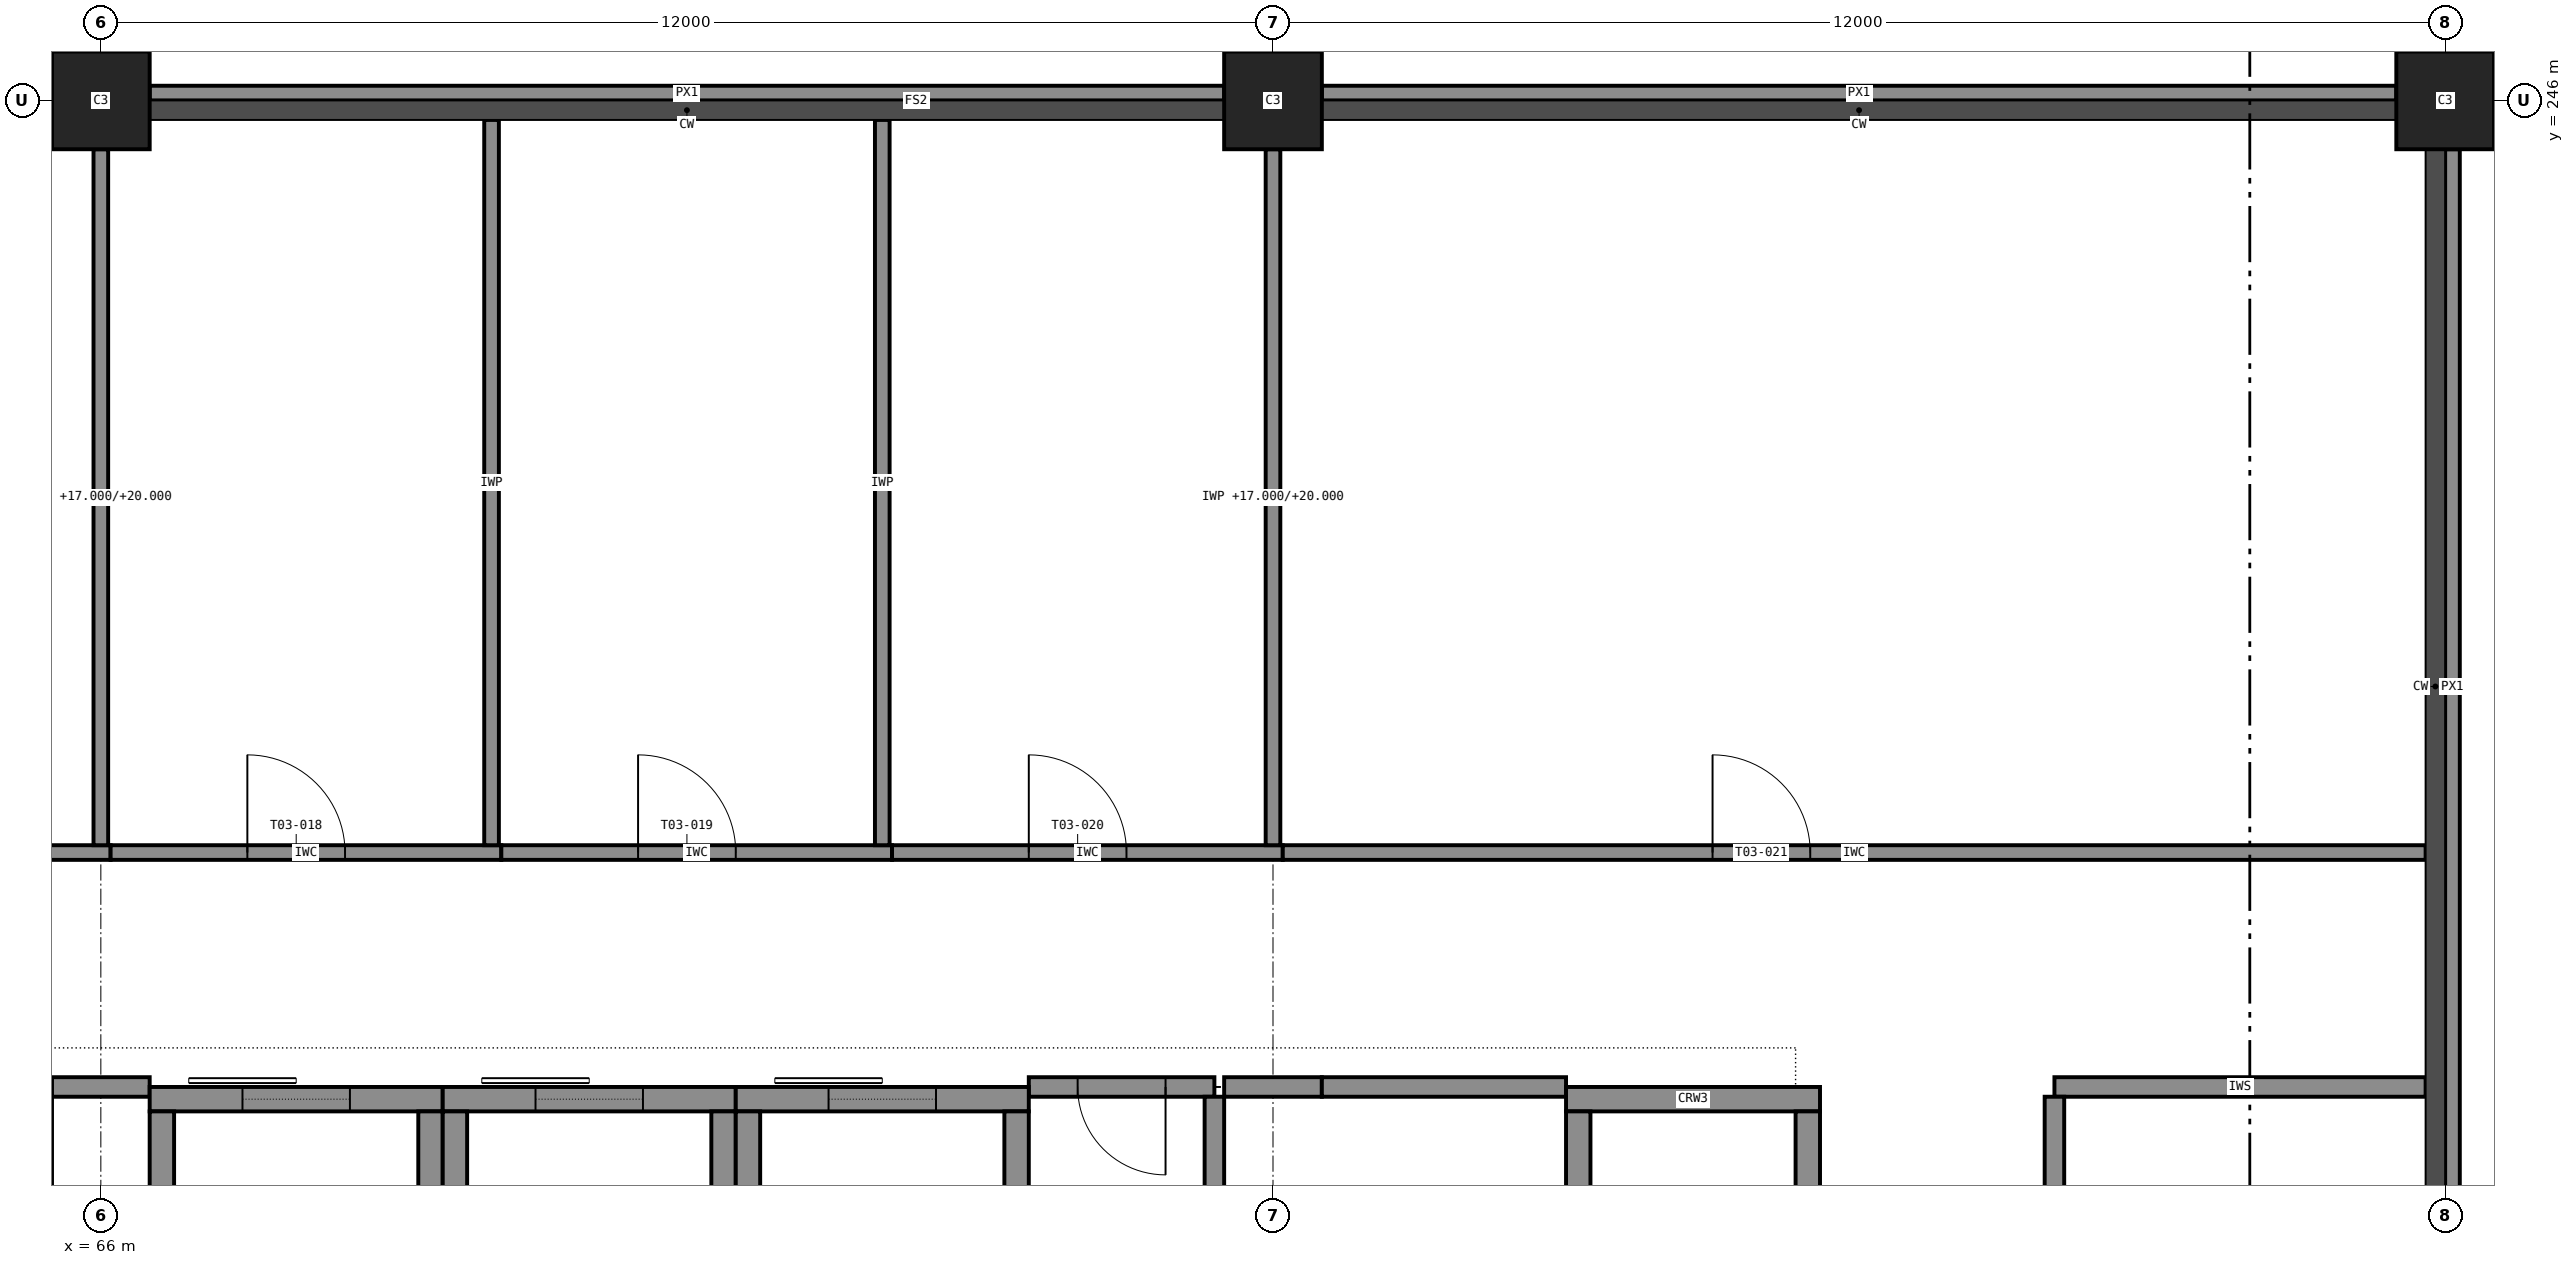
"""IFC4 building model, lengths in metres.
Left out: names, types, materials, properties, quantities, classifications, styles, units other than length and angle.
Written with IfcOpenShell. Run it as: python <this file> out.ifc"""

import sys

from ifc_helpers import new_model, si_unit, direction, frame, frame_2d, origin, origin_2d, place, context, subcontext, project, spatial, rectangle, extrude, element, fill, save


model = new_model("IFC4")
c1 = context("Model", 3, precision=1e-05, world=origin(), true_north=direction((0.0, 1.0)))
c2 = subcontext(c1, "Body", "Model", "MODEL_VIEW")
j1 = project(units=[si_unit("LENGTHUNIT", "METRE"), si_unit("PLANEANGLEUNIT", "RADIAN")], contexts=[c1])
p1 = place(None, origin())
s1 = spatial("IfcSite", under=j1, at=p1, CompositionType="ELEMENT")
p2 = place(p1, origin())
s2 = spatial("IfcBuilding", under=s1, at=p2, CompositionType="ELEMENT")
p3 = place(p2, frame((0.0, 0.0, 17.0)))
s3 = spatial("IfcBuildingStorey", under=s2, at=p3, CompositionType="ELEMENT", Elevation=17.0)
for number, where, z_axis, x_axis in (
    (1, (66.0, 246.0, 0.0), (0.0, 0.0, 1.0), (1.0, 0.0, 0.0)),
    (2, (78.0, 246.0, 0.0), (0.0, 0.0, 1.0), (1.0, 0.0, 0.0)),
    (3, (90.0, 246.0, 0.0), (0.0, 0.0, 1.0), (1.0, 0.0, 0.0)),
):
    element("IfcColumn", number, at=place(p3, frame(where, z_axis=z_axis, x_axis=x_axis)), inside=s3, PredefinedType="COLUMN", context=c2, shape_type="SweptSolid", body=[
        extrude(rectangle(XDim=1.0, YDim=1.0, at=origin_2d()), origin(), (0.0, 0.0, 1.0), 4.0),
    ])
p4 = place(p3, frame((66.5, 235.775, 0.0), z_axis=(0.0, 0.0, 1.0), x_axis=(1.0, 0.0, 0.0)))
e4 = element("IfcWall", 4, at=p4, inside=s3, PredefinedType="SHEAR", context=c2, shape_type="SweptSolid", body=[
    extrude(rectangle(XDim=3.0, YDim=0.25, at=frame_2d((1.5, 0.0))), origin(), (0.0, 0.0, 1.0), 4.0),
])
p5 = place(p4, frame((0.95, 0.0, 0.0)))
e5 = element("IfcOpeningElement", 5, at=p5, cuts=e4, PredefinedType="OPENING", context=c2, shape_type="SweptSolid", body=[
    extrude(rectangle(XDim=1.1, YDim=2.1, at=frame_2d((0.55, 1.05))), frame((0.0, 0.135, 0.0), z_axis=(0.0, -1.0, 0.0), x_axis=(1.0, 0.0, 0.0)), (0.0, 0.0, 1.0), 0.27),
])
for number, where, z_axis, x_axis in (
    (6, (66.625, 232.35, 0.0), (0.0, 0.0, 1.0), (0.0, 1.0, 0.0)),
    (7, (69.375, 232.35, 0.0), (0.0, 0.0, 1.0), (0.0, 1.0, 0.0)),
):
    element("IfcWall", number, at=place(p3, frame(where, z_axis=z_axis, x_axis=x_axis)), inside=s3, PredefinedType="SHEAR", context=c2, shape_type="SweptSolid", body=[
        extrude(rectangle(XDim=3.3, YDim=0.25, at=frame_2d((1.65, 0.0))), origin(), (0.0, 0.0, 1.0), 4.0),
    ])
p6 = place(p3, frame((69.5, 235.775, 0.0), z_axis=(0.0, 0.0, 1.0), x_axis=(1.0, 0.0, 0.0)))
e8 = element("IfcWall", 8, at=p6, inside=s3, PredefinedType="SHEAR", context=c2, shape_type="SweptSolid", body=[
    extrude(rectangle(XDim=3.0, YDim=0.25, at=frame_2d((1.5, 0.0))), origin(), (0.0, 0.0, 1.0), 4.0),
])
p7 = place(p6, frame((0.95, 0.0, 0.0)))
e9 = element("IfcOpeningElement", 9, at=p7, cuts=e8, PredefinedType="OPENING", context=c2, shape_type="SweptSolid", body=[
    extrude(rectangle(XDim=1.1, YDim=2.1, at=frame_2d((0.55, 1.05))), frame((0.0, 0.135, 0.0), z_axis=(0.0, -1.0, 0.0), x_axis=(1.0, 0.0, 0.0)), (0.0, 0.0, 1.0), 0.27),
])
for number, where, z_axis, x_axis in (
    (10, (69.625, 232.35, 0.0), (0.0, 0.0, 1.0), (0.0, 1.0, 0.0)),
    (11, (72.375, 232.35, 0.0), (0.0, 0.0, 1.0), (0.0, 1.0, 0.0)),
):
    element("IfcWall", number, at=place(p3, frame(where, z_axis=z_axis, x_axis=x_axis)), inside=s3, PredefinedType="SHEAR", context=c2, shape_type="SweptSolid", body=[
        extrude(rectangle(XDim=3.3, YDim=0.25, at=frame_2d((1.65, 0.0))), origin(), (0.0, 0.0, 1.0), 4.0),
    ])
p8 = place(p3, frame((72.5, 235.775, 0.0), z_axis=(0.0, 0.0, 1.0), x_axis=(1.0, 0.0, 0.0)))
e12 = element("IfcWall", 12, at=p8, inside=s3, PredefinedType="SHEAR", context=c2, shape_type="SweptSolid", body=[
    extrude(rectangle(XDim=3.0, YDim=0.25, at=frame_2d((1.5, 0.0))), origin(), (0.0, 0.0, 1.0), 4.0),
])
p9 = place(p8, frame((0.95, 0.0, 0.0)))
e13 = element("IfcOpeningElement", 13, at=p9, cuts=e12, PredefinedType="OPENING", context=c2, shape_type="SweptSolid", body=[
    extrude(rectangle(XDim=1.1, YDim=2.1, at=frame_2d((0.55, 1.05))), frame((0.0, 0.135, 0.0), z_axis=(0.0, -1.0, 0.0), x_axis=(1.0, 0.0, 0.0)), (0.0, 0.0, 1.0), 0.27),
])
for number, where, z_axis, x_axis in (
    (14, (72.625, 232.35, 0.0), (0.0, 0.0, 1.0), (0.0, 1.0, 0.0)),
    (15, (75.375, 232.35, 0.0), (0.0, 0.0, 1.0), (0.0, 1.0, 0.0)),
):
    element("IfcWall", number, at=place(p3, frame(where, z_axis=z_axis, x_axis=x_axis)), inside=s3, PredefinedType="SHEAR", context=c2, shape_type="SweptSolid", body=[
        extrude(rectangle(XDim=3.3, YDim=0.25, at=frame_2d((1.65, 0.0))), origin(), (0.0, 0.0, 1.0), 4.0),
    ])
p10 = place(p3, frame((81.0, 235.775, 0.0), z_axis=(0.0, 0.0, 1.0), x_axis=(1.0, 0.0, 0.0)))
e16 = element("IfcWall", 16, at=p10, inside=s3, PredefinedType="SHEAR", context=c2, shape_type="SweptSolid", body=[
    extrude(rectangle(XDim=2.6, YDim=0.25, at=frame_2d((1.3, 0.0))), origin(), (0.0, 0.0, 1.0), 4.0),
])
p11 = place(p3, frame((81.125, 232.35, 0.0), z_axis=(0.0, 0.0, 1.0), x_axis=(0.0, 1.0, 0.0)))
e17 = element("IfcWall", 17, at=p11, inside=s3, PredefinedType="SHEAR", context=c2, shape_type="SweptSolid", body=[
    extrude(rectangle(XDim=3.3, YDim=0.25, at=frame_2d((1.65, 0.0))), origin(), (0.0, 0.0, 1.0), 4.0),
])
p12 = place(p11, frame((1.1, 0.0, 0.0)))
e18 = element("IfcOpeningElement", 18, at=p12, cuts=e17, PredefinedType="OPENING", context=c2, shape_type="SweptSolid", body=[
    extrude(rectangle(XDim=1.1, YDim=2.1, at=frame_2d((0.55, 1.05))), frame((0.0, 0.135, 0.0), z_axis=(0.0, -1.0, 0.0), x_axis=(1.0, 0.0, 0.0)), (0.0, 0.0, 1.0), 0.27),
])
p13 = place(p3, frame((83.475, 232.35, 0.0), z_axis=(0.0, 0.0, 1.0), x_axis=(0.0, 1.0, 0.0)))
e19 = element("IfcWall", 19, at=p13, inside=s3, PredefinedType="SHEAR", context=c2, shape_type="SweptSolid", body=[
    extrude(rectangle(XDim=3.3, YDim=0.25, at=frame_2d((1.65, 0.0))), origin(), (0.0, 0.0, 1.0), 4.0),
])
for number, where, z_axis, x_axis in (
    (20, (90.075, 234.5, 3.8), (0.0, 0.0, 1.0), (0.0, 1.0, 0.0)),
    (21, (89.5, 246.075, 3.8), (0.0, 0.0, 1.0), (-1.0, 0.0, 0.0)),
    (22, (77.5, 246.075, 3.8), (0.0, 0.0, 1.0), (-1.0, 0.0, 0.0)),
):
    element("IfcWall", number, at=place(p3, frame(where, z_axis=z_axis, x_axis=x_axis)), inside=s3, PredefinedType="STANDARD", context=c2, shape_type="SweptSolid", body=[
        extrude(rectangle(XDim=11.0, YDim=0.15, at=frame_2d((5.5, 0.0))), origin(), (0.0, 0.0, 1.0), 0.2),
    ])
p14 = place(p3, frame((65.5, 235.9, 0.0), z_axis=(0.0, 0.0, 1.0), x_axis=(1.0, 0.0, 0.0)))
e23 = element("IfcWall", 23, at=p14, inside=s3, PredefinedType="PARTITIONING", context=c2, shape_type="SweptSolid", body=[
    extrude(rectangle(XDim=1.0, YDim=0.2, at=frame_2d((0.5, 0.0))), origin(), (0.0, 0.0, 1.0), 3.8),
])
p15 = place(p3, frame((77.4, 235.9, 0.0), z_axis=(0.0, 0.0, 1.0), x_axis=(-1.0, 0.0, 0.0)))
e24 = element("IfcWall", 24, at=p15, inside=s3, PredefinedType="PARTITIONING", context=c2, shape_type="SweptSolid", body=[
    extrude(rectangle(XDim=1.9, YDim=0.2, at=frame_2d((0.95, 0.0))), origin(), (0.0, 0.0, 1.0), 3.8),
])
p16 = place(p15, frame((0.5, 0.0, 0.0)))
e25 = element("IfcOpeningElement", 25, at=p16, cuts=e24, PredefinedType="OPENING", context=c2, shape_type="SweptSolid", body=[
    extrude(rectangle(XDim=0.9, YDim=2.1, at=frame_2d((0.45, 1.05))), frame((0.0, 0.11, 0.0), z_axis=(0.0, -1.0, 0.0), x_axis=(1.0, 0.0, 0.0)), (0.0, 0.0, 1.0), 0.22),
])
p17 = place(p3, frame((77.5, 235.9, 0.0), z_axis=(0.0, 0.0, 1.0), x_axis=(1.0, 0.0, 0.0)))
e26 = element("IfcWall", 26, at=p17, inside=s3, PredefinedType="PARTITIONING", context=c2, shape_type="SweptSolid", body=[
    extrude(rectangle(XDim=1.0, YDim=0.2, at=frame_2d((0.5, 0.0))), origin(), (0.0, 0.0, 1.0), 3.8),
])
p18 = place(p3, frame((78.5, 235.9, 0.0), z_axis=(0.0, 0.0, 1.0), x_axis=(1.0, 0.0, 0.0)))
e27 = element("IfcWall", 27, at=p18, inside=s3, PredefinedType="PARTITIONING", context=c2, shape_type="SweptSolid", body=[
    extrude(rectangle(XDim=2.5, YDim=0.2, at=frame_2d((1.25, 0.0))), origin(), (0.0, 0.0, 1.0), 3.8),
])
p19 = place(p3, frame((86.0, 235.9, 0.0), z_axis=(0.0, 0.0, 1.0), x_axis=(1.0, 0.0, 0.0)))
e28 = element("IfcWall", 28, at=p19, inside=s3, PredefinedType="PARTITIONING", context=c2, shape_type="SweptSolid", body=[
    extrude(rectangle(XDim=3.8, YDim=0.2, at=frame_2d((1.9, 0.0))), origin(), (0.0, 0.0, 1.0), 3.8),
])
p20 = place(p3, frame((77.4, 232.2, 0.0), z_axis=(0.0, 0.0, 1.0), x_axis=(0.0, 1.0, 0.0)))
e29 = element("IfcWall", 29, at=p20, inside=s3, PredefinedType="PARTITIONING", context=c2, shape_type="SweptSolid", body=[
    extrude(rectangle(XDim=3.6, YDim=0.2, at=frame_2d((1.8, 0.0))), origin(), (0.0, 0.0, 1.0), 3.8),
])
p21 = place(p3, frame((86.0, 235.8, 0.0), z_axis=(0.0, 0.0, 1.0), x_axis=(0.0, -1.0, 0.0)))
e30 = element("IfcWall", 30, at=p21, inside=s3, PredefinedType="PARTITIONING", context=c2, shape_type="SweptSolid", body=[
    extrude(rectangle(XDim=3.6, YDim=0.2, at=frame_2d((1.8, 0.0))), origin(), (0.0, 0.0, 1.0), 3.8),
])
p22 = place(p21, frame((1.35, 0.0, 0.0)))
e31 = element("IfcOpeningElement", 31, at=p22, cuts=e30, PredefinedType="OPENING", context=c2, shape_type="SweptSolid", body=[
    extrude(rectangle(XDim=0.9, YDim=2.1, at=frame_2d((0.45, 1.05))), frame((0.0, 0.11, 0.0), z_axis=(0.0, -1.0, 0.0), x_axis=(1.0, 0.0, 0.0)), (0.0, 0.0, 1.0), 0.22),
])
p23 = place(p3, frame((62.1, 238.3, 0.0), z_axis=(0.0, 0.0, 1.0), x_axis=(1.0, 0.0, 0.0)))
e32 = element("IfcWall", 32, at=p23, inside=s3, PredefinedType="PARTITIONING", context=c2, shape_type="SweptSolid", body=[
    extrude(rectangle(XDim=4.0, YDim=0.15, at=frame_2d((2.0, 0.0))), origin(), (0.0, 0.0, 1.0), 3.8),
])
p24 = place(p23, frame((1.4, 0.0, 0.0)))
e33 = element("IfcOpeningElement", 33, at=p24, cuts=e32, PredefinedType="OPENING", context=c2, shape_type="SweptSolid", body=[
    extrude(rectangle(XDim=1.0, YDim=2.1, at=frame_2d((0.5, 1.05))), frame((0.0, 0.085, 0.0), z_axis=(0.0, -1.0, 0.0), x_axis=(1.0, 0.0, 0.0)), (0.0, 0.0, 1.0), 0.17),
])
p25 = place(p3, frame((66.1, 238.3, 0.0), z_axis=(0.0, 0.0, 1.0), x_axis=(1.0, 0.0, 0.0)))
e34 = element("IfcWall", 34, at=p25, inside=s3, PredefinedType="PARTITIONING", context=c2, shape_type="SweptSolid", body=[
    extrude(rectangle(XDim=4.0, YDim=0.15, at=frame_2d((2.0, 0.0))), origin(), (0.0, 0.0, 1.0), 3.8),
])
p26 = place(p25, frame((1.4, 0.0, 0.0)))
e35 = element("IfcOpeningElement", 35, at=p26, cuts=e34, PredefinedType="OPENING", context=c2, shape_type="SweptSolid", body=[
    extrude(rectangle(XDim=1.0, YDim=2.1, at=frame_2d((0.5, 1.05))), frame((0.0, 0.085, 0.0), z_axis=(0.0, -1.0, 0.0), x_axis=(1.0, 0.0, 0.0)), (0.0, 0.0, 1.0), 0.17),
])
p27 = place(p3, frame((66.0, 245.5, 0.0), z_axis=(0.0, 0.0, 1.0), x_axis=(0.0, -1.0, 0.0)))
e36 = element("IfcWall", 36, at=p27, inside=s3, PredefinedType="PARTITIONING", context=c2, shape_type="SweptSolid", body=[
    extrude(rectangle(XDim=7.125, YDim=0.15, at=frame_2d((3.562, 0.0))), origin(), (0.0, 0.0, 1.0), 3.0),
])
p28 = place(p3, frame((70.1, 238.3, 0.0), z_axis=(0.0, 0.0, 1.0), x_axis=(1.0, 0.0, 0.0)))
e37 = element("IfcWall", 37, at=p28, inside=s3, PredefinedType="PARTITIONING", context=c2, shape_type="SweptSolid", body=[
    extrude(rectangle(XDim=4.0, YDim=0.15, at=frame_2d((2.0, 0.0))), origin(), (0.0, 0.0, 1.0), 3.8),
])
p29 = place(p28, frame((1.4, 0.0, 0.0)))
e38 = element("IfcOpeningElement", 38, at=p29, cuts=e37, PredefinedType="OPENING", context=c2, shape_type="SweptSolid", body=[
    extrude(rectangle(XDim=1.0, YDim=2.1, at=frame_2d((0.5, 1.05))), frame((0.0, 0.085, 0.0), z_axis=(0.0, -1.0, 0.0), x_axis=(1.0, 0.0, 0.0)), (0.0, 0.0, 1.0), 0.17),
])
p30 = place(p3, frame((70.0, 245.8, 0.0), z_axis=(0.0, 0.0, 1.0), x_axis=(0.0, -1.0, 0.0)))
e39 = element("IfcWall", 39, at=p30, inside=s3, PredefinedType="PARTITIONING", context=c2, shape_type="SweptSolid", body=[
    extrude(rectangle(XDim=7.425, YDim=0.15, at=frame_2d((3.712, 0.0))), origin(), (0.0, 0.0, 1.0), 3.8),
])
p31 = place(p3, frame((74.1, 238.3, 0.0), z_axis=(0.0, 0.0, 1.0), x_axis=(1.0, 0.0, 0.0)))
e40 = element("IfcWall", 40, at=p31, inside=s3, PredefinedType="PARTITIONING", context=c2, shape_type="SweptSolid", body=[
    extrude(rectangle(XDim=4.0, YDim=0.15, at=frame_2d((2.0, 0.0))), origin(), (0.0, 0.0, 1.0), 3.8),
])
p32 = place(p31, frame((1.4, 0.0, 0.0)))
e41 = element("IfcOpeningElement", 41, at=p32, cuts=e40, PredefinedType="OPENING", context=c2, shape_type="SweptSolid", body=[
    extrude(rectangle(XDim=1.0, YDim=2.1, at=frame_2d((0.5, 1.05))), frame((0.0, 0.085, 0.0), z_axis=(0.0, -1.0, 0.0), x_axis=(1.0, 0.0, 0.0)), (0.0, 0.0, 1.0), 0.17),
])
p33 = place(p3, frame((74.0, 245.8, 0.0), z_axis=(0.0, 0.0, 1.0), x_axis=(0.0, -1.0, 0.0)))
e42 = element("IfcWall", 42, at=p33, inside=s3, PredefinedType="PARTITIONING", context=c2, shape_type="SweptSolid", body=[
    extrude(rectangle(XDim=7.425, YDim=0.15, at=frame_2d((3.712, 0.0))), origin(), (0.0, 0.0, 1.0), 3.8),
])
p34 = place(p3, frame((78.1, 238.3, 0.0), z_axis=(0.0, 0.0, 1.0), x_axis=(1.0, 0.0, 0.0)))
e43 = element("IfcWall", 43, at=p34, inside=s3, PredefinedType="PARTITIONING", context=c2, shape_type="SweptSolid", body=[
    extrude(rectangle(XDim=11.7, YDim=0.15, at=frame_2d((5.85, 0.0))), origin(), (0.0, 0.0, 1.0), 3.8),
])
p35 = place(p34, frame((4.4, 0.0, 0.0)))
e44 = element("IfcOpeningElement", 44, at=p35, cuts=e43, PredefinedType="OPENING", context=c2, shape_type="SweptSolid", body=[
    extrude(rectangle(XDim=1.0, YDim=2.1, at=frame_2d((0.5, 1.05))), frame((0.0, 0.085, 0.0), z_axis=(0.0, -1.0, 0.0), x_axis=(1.0, 0.0, 0.0)), (0.0, 0.0, 1.0), 0.17),
])
p36 = place(p3, frame((78.0, 245.5, 0.0), z_axis=(0.0, 0.0, 1.0), x_axis=(0.0, -1.0, 0.0)))
e45 = element("IfcWall", 45, at=p36, inside=s3, PredefinedType="PARTITIONING", context=c2, shape_type="SweptSolid", body=[
    extrude(rectangle(XDim=7.125, YDim=0.15, at=frame_2d((3.562, 0.0))), origin(), (0.0, 0.0, 1.0), 3.0),
])
p37 = place(p16, origin())
e46 = element("IfcDoor", 46, at=p37, inside=s3, OperationType="SINGLE_SWING_LEFT", PredefinedType="DOOR", context=c2, shape_type="SweptSolid", body=[
    extrude(rectangle(XDim=0.9, YDim=2.1, at=frame_2d((0.45, 1.05))), frame((0.0, 0.025, 0.0), z_axis=(0.0, -1.0, 0.0), x_axis=(1.0, 0.0, 0.0)), (0.0, 0.0, 1.0), 0.05),
])
fill(e25, e46)
p38 = place(p26, origin())
e47 = element("IfcDoor", 47, at=p38, inside=s3, OperationType="SINGLE_SWING_LEFT", PredefinedType="DOOR", context=c2, shape_type="SweptSolid", body=[
    extrude(rectangle(XDim=1.0, YDim=2.1, at=frame_2d((0.5, 1.05))), frame((0.0, 0.025, 0.0), z_axis=(0.0, -1.0, 0.0), x_axis=(1.0, 0.0, 0.0)), (0.0, 0.0, 1.0), 0.05),
])
fill(e35, e47)
p39 = place(p29, origin())
e48 = element("IfcDoor", 48, at=p39, inside=s3, OperationType="SINGLE_SWING_LEFT", PredefinedType="DOOR", context=c2, shape_type="SweptSolid", body=[
    extrude(rectangle(XDim=1.0, YDim=2.1, at=frame_2d((0.5, 1.05))), frame((0.0, 0.025, 0.0), z_axis=(0.0, -1.0, 0.0), x_axis=(1.0, 0.0, 0.0)), (0.0, 0.0, 1.0), 0.05),
])
fill(e38, e48)
p40 = place(p32, origin())
e49 = element("IfcDoor", 49, at=p40, inside=s3, OperationType="SINGLE_SWING_LEFT", PredefinedType="DOOR", context=c2, shape_type="SweptSolid", body=[
    extrude(rectangle(XDim=1.0, YDim=2.1, at=frame_2d((0.5, 1.05))), frame((0.0, 0.025, 0.0), z_axis=(0.0, -1.0, 0.0), x_axis=(1.0, 0.0, 0.0)), (0.0, 0.0, 1.0), 0.05),
])
fill(e41, e49)
p41 = place(p35, origin())
e50 = element("IfcDoor", 50, at=p41, inside=s3, OperationType="SINGLE_SWING_LEFT", PredefinedType="DOOR", context=c2, shape_type="SweptSolid", body=[
    extrude(rectangle(XDim=1.0, YDim=2.1, at=frame_2d((0.5, 1.05))), frame((0.0, 0.025, 0.0), z_axis=(0.0, -1.0, 0.0), x_axis=(1.0, 0.0, 0.0)), (0.0, 0.0, 1.0), 0.05),
])
fill(e44, e50)
p42 = place(p5, origin())
e51 = element("IfcDoor", 51, at=p42, inside=s3, OperationType="SLIDING_TO_LEFT", PredefinedType="DOOR", context=c2, shape_type="SweptSolid", body=[
    extrude(rectangle(XDim=1.1, YDim=2.1, at=frame_2d((0.55, 1.05))), frame((0.0, 0.025, 0.0), z_axis=(0.0, -1.0, 0.0), x_axis=(1.0, 0.0, 0.0)), (0.0, 0.0, 1.0), 0.05),
])
fill(e5, e51)
p43 = place(p7, origin())
e52 = element("IfcDoor", 52, at=p43, inside=s3, OperationType="SLIDING_TO_LEFT", PredefinedType="DOOR", context=c2, shape_type="SweptSolid", body=[
    extrude(rectangle(XDim=1.1, YDim=2.1, at=frame_2d((0.55, 1.05))), frame((0.0, 0.025, 0.0), z_axis=(0.0, -1.0, 0.0), x_axis=(1.0, 0.0, 0.0)), (0.0, 0.0, 1.0), 0.05),
])
fill(e9, e52)
p44 = place(p9, origin())
e53 = element("IfcDoor", 53, at=p44, inside=s3, OperationType="SLIDING_TO_LEFT", PredefinedType="DOOR", context=c2, shape_type="SweptSolid", body=[
    extrude(rectangle(XDim=1.1, YDim=2.1, at=frame_2d((0.55, 1.05))), frame((0.0, 0.025, 0.0), z_axis=(0.0, -1.0, 0.0), x_axis=(1.0, 0.0, 0.0)), (0.0, 0.0, 1.0), 0.05),
])
fill(e13, e53)
save(model, sys.argv[1])
